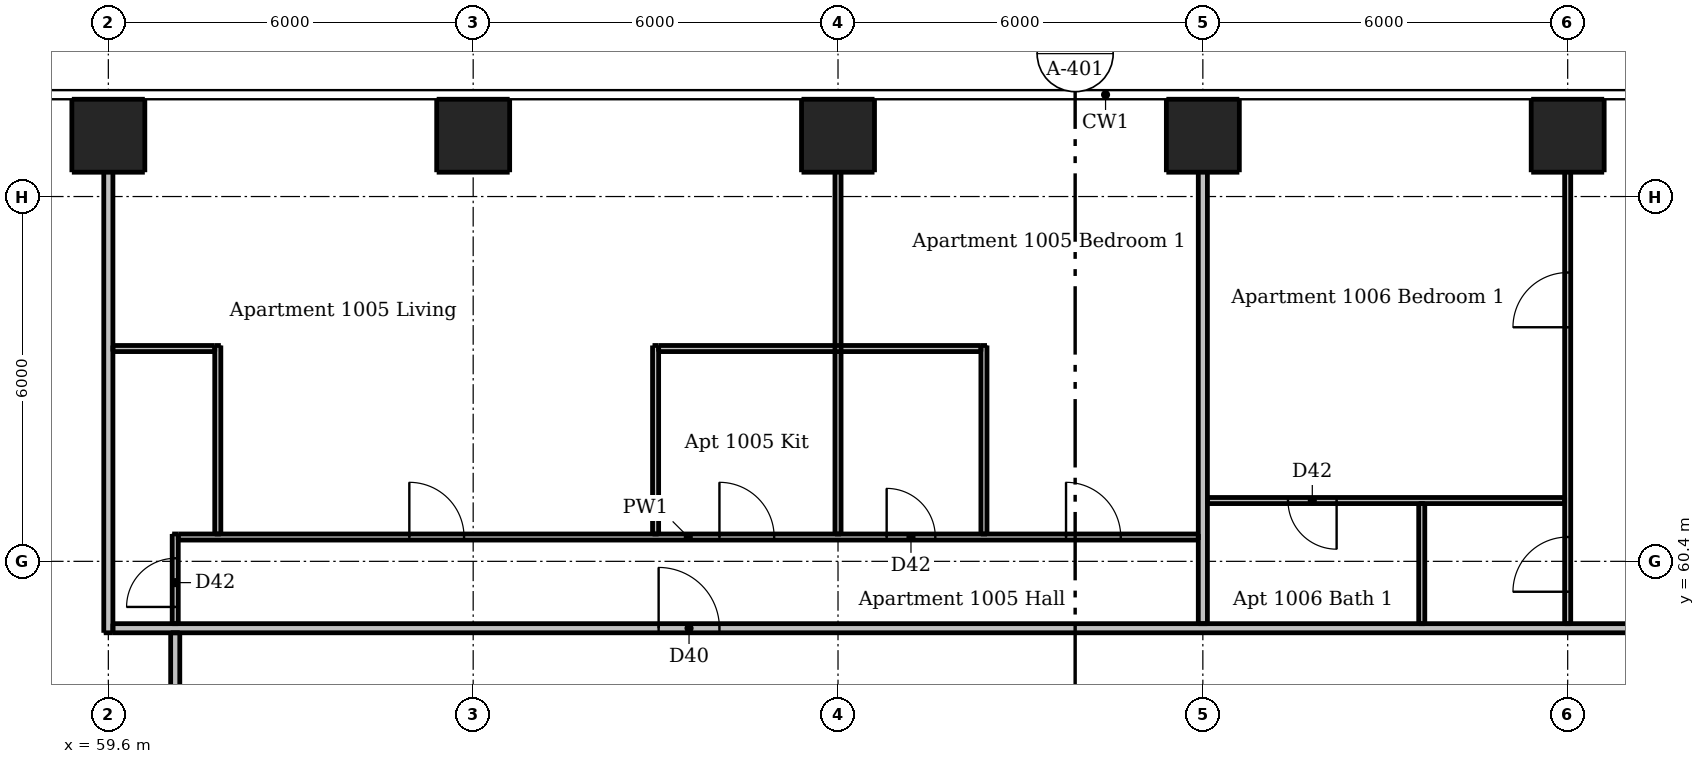
"""IFC4 building model, lengths in metres.
Left out: names, types, materials, properties, quantities, classifications, styles, units other than length and angle.
Written with IfcOpenShell. Run it as: python <this file> out.ifc"""

import sys

from ifc_helpers import new_model, si_unit, direction, frame, frame_2d, origin, origin_2d, place, context, subcontext, project, spatial, rectangle, extrude, element, fill, save


model = new_model("IFC4")
c1 = context("Model", 3, precision=1e-05, world=origin(), true_north=direction((0.0, 1.0)))
c2 = subcontext(c1, "Body", "Model", "MODEL_VIEW")
j1 = project(units=[si_unit("LENGTHUNIT", "METRE"), si_unit("PLANEANGLEUNIT", "RADIAN")], contexts=[c1])
p1 = place(None, origin())
s1 = spatial("IfcSite", under=j1, at=p1, CompositionType="ELEMENT")
p2 = place(p1, origin())
s2 = spatial("IfcBuilding", under=s1, at=p2, CompositionType="ELEMENT")
p3 = place(p2, frame((0.0, 0.0, 40.0)))
s3 = spatial("IfcBuildingStorey", under=s2, at=p3, CompositionType="ELEMENT", Elevation=40.0)
for number, where, z_axis, x_axis in (
    (1, (59.6, 67.4, 0.0), (0.0, 0.0, 1.0), (1.0, 0.0, 0.0)),
    (2, (65.6, 67.4, 0.0), (0.0, 0.0, 1.0), (1.0, 0.0, 0.0)),
    (3, (71.6, 67.4, 0.0), (0.0, 0.0, 1.0), (1.0, 0.0, 0.0)),
    (4, (77.6, 67.4, 0.0), (0.0, 0.0, 1.0), (1.0, 0.0, 0.0)),
    (5, (83.6, 67.4, 0.0), (0.0, 0.0, 1.0), (1.0, 0.0, 0.0)),
):
    element("IfcColumn", number, at=place(p3, frame(where, z_axis=z_axis, x_axis=x_axis)), inside=s3, PredefinedType="COLUMN", context=c2, shape_type="SweptSolid", body=[
        extrude(rectangle(XDim=1.2, YDim=1.2, at=origin_2d()), origin(), (0.0, 0.0, 1.0), 3.05),
    ])
p4 = place(p3, frame((60.7, 59.375, 0.0), z_axis=(0.0, 0.0, 1.0), x_axis=(0.0, 1.0, 0.0)))
e6 = element("IfcWall", 6, at=p4, inside=s3, PredefinedType="PARTITIONING", context=c2, shape_type="SweptSolid", body=[
    extrude(rectangle(XDim=1.475, YDim=0.1, at=frame_2d((0.738, 0.0))), origin(), (0.0, 0.0, 1.0), 3.05),
])
p5 = place(p4, frame((0.275, 0.0, 0.0)))
e7 = element("IfcOpeningElement", 7, at=p5, cuts=e6, PredefinedType="OPENING", context=c2, shape_type="SweptSolid", body=[
    extrude(rectangle(XDim=0.8, YDim=2.1, at=frame_2d((0.4, 1.05))), frame((0.0, 0.06, 0.0), z_axis=(0.0, -1.0, 0.0), x_axis=(1.0, 0.0, 0.0)), (0.0, 0.0, 1.0), 0.12),
])
for number, where, z_axis, x_axis in (
    (8, (61.4, 60.85, 0.0), (0.0, 0.0, 1.0), (0.0, 1.0, 0.0)),
    (9, (68.6, 60.85, 0.0), (0.0, 0.0, 1.0), (0.0, 1.0, 0.0)),
):
    element("IfcWall", number, at=place(p3, frame(where, z_axis=z_axis, x_axis=x_axis)), inside=s3, PredefinedType="PARTITIONING", context=c2, shape_type="SweptSolid", body=[
        extrude(rectangle(XDim=3.1, YDim=0.1, at=frame_2d((1.55, 0.0))), origin(), (0.0, 0.0, 1.0), 3.05),
    ])
p6 = place(p3, frame((71.6, 60.85, 0.0), z_axis=(0.0, 0.0, 1.0), x_axis=(0.0, 1.0, 0.0)))
e10 = element("IfcWall", 10, at=p6, inside=s3, PredefinedType="PARTITIONING", context=c2, shape_type="SweptSolid", body=[
    extrude(rectangle(XDim=7.15, YDim=0.1, at=frame_2d((3.575, 0.0))), origin(), (0.0, 0.0, 1.0), 2.516),
])
p7 = place(p3, frame((74.0, 60.85, 0.0), z_axis=(0.0, 0.0, 1.0), x_axis=(0.0, 1.0, 0.0)))
e11 = element("IfcWall", 11, at=p7, inside=s3, PredefinedType="PARTITIONING", context=c2, shape_type="SweptSolid", body=[
    extrude(rectangle(XDim=3.1, YDim=0.1, at=frame_2d((1.55, 0.0))), origin(), (0.0, 0.0, 1.0), 3.05),
])
p8 = place(p3, frame((81.2, 59.375, 0.0), z_axis=(0.0, 0.0, 1.0), x_axis=(0.0, 1.0, 0.0)))
e12 = element("IfcWall", 12, at=p8, inside=s3, PredefinedType="PARTITIONING", context=c2, shape_type="SweptSolid", body=[
    extrude(rectangle(XDim=1.975, YDim=0.1, at=frame_2d((0.988, 0.0))), origin(), (0.0, 0.0, 1.0), 3.05),
])
p9 = place(p3, frame((83.6, 59.375, 0.0), z_axis=(0.0, 0.0, 1.0), x_axis=(0.0, 1.0, 0.0)))
e13 = element("IfcWall", 13, at=p9, inside=s3, PredefinedType="PARTITIONING", context=c2, shape_type="SweptSolid", body=[
    extrude(rectangle(XDim=8.625, YDim=0.1, at=frame_2d((4.312, 0.0))), origin(), (0.0, 0.0, 1.0), 2.516),
])
p10 = place(p9, frame((0.525, 0.0, 0.0)))
e14 = element("IfcOpeningElement", 14, at=p10, cuts=e13, PredefinedType="OPENING", context=c2, shape_type="SweptSolid", body=[
    extrude(rectangle(XDim=0.9, YDim=2.1, at=frame_2d((0.45, 1.05))), frame((0.0, 0.06, 0.0), z_axis=(0.0, -1.0, 0.0), x_axis=(1.0, 0.0, 0.0)), (0.0, 0.0, 1.0), 0.12),
])
p11 = place(p9, frame((4.875, 0.0, 0.0)))
e15 = element("IfcOpeningElement", 15, at=p11, cuts=e13, PredefinedType="OPENING", context=c2, shape_type="SweptSolid", body=[
    extrude(rectangle(XDim=0.9, YDim=2.1, at=frame_2d((0.45, 1.05))), frame((0.0, 0.06, 0.0), z_axis=(0.0, -1.0, 0.0), x_axis=(1.0, 0.0, 0.0)), (0.0, 0.0, 1.0), 0.12),
])
p12 = place(p3, frame((59.675, 63.9, 0.0), z_axis=(0.0, 0.0, 1.0), x_axis=(1.0, 0.0, 0.0)))
e16 = element("IfcWall", 16, at=p12, inside=s3, PredefinedType="PARTITIONING", context=c2, shape_type="SweptSolid", body=[
    extrude(rectangle(XDim=1.675, YDim=0.1, at=frame_2d((0.837, 0.0))), origin(), (0.0, 0.0, 1.0), 3.05),
])
p13 = place(p3, frame((68.65, 63.9, 0.0), z_axis=(0.0, 0.0, 1.0), x_axis=(1.0, 0.0, 0.0)))
e17 = element("IfcWall", 17, at=p13, inside=s3, PredefinedType="PARTITIONING", context=c2, shape_type="SweptSolid", body=[
    extrude(rectangle(XDim=5.3, YDim=0.1, at=frame_2d((2.65, 0.0))), origin(), (0.0, 0.0, 1.0), 3.05),
])
p14 = place(p3, frame((83.55, 61.4, 0.0), z_axis=(0.0, 0.0, 1.0), x_axis=(-1.0, 0.0, 0.0)))
e18 = element("IfcWall", 18, at=p14, inside=s3, PredefinedType="PARTITIONING", context=c2, shape_type="SweptSolid", body=[
    extrude(rectangle(XDim=5.875, YDim=0.1, at=frame_2d((2.938, 0.0))), origin(), (0.0, 0.0, 1.0), 3.05),
])
p15 = place(p14, frame((3.75, 0.0, 0.0)))
e19 = element("IfcOpeningElement", 19, at=p15, cuts=e18, PredefinedType="OPENING", context=c2, shape_type="SweptSolid", body=[
    extrude(rectangle(XDim=0.8, YDim=2.1, at=frame_2d((0.4, 1.05))), frame((0.0, 0.06, 0.0), z_axis=(0.0, -1.0, 0.0), x_axis=(1.0, 0.0, 0.0)), (0.0, 0.0, 1.0), 0.12),
])
p16 = place(p3, frame((60.75, 60.8, 0.0), z_axis=(0.0, 0.0, 1.0), x_axis=(1.0, 0.0, 0.0)))
e20 = element("IfcWall", 20, at=p16, inside=s3, PredefinedType="PARTITIONING", context=c2, shape_type="SweptSolid", body=[
    extrude(rectangle(XDim=16.775, YDim=0.1, at=frame_2d((8.387, 0.0))), origin(), (0.0, 0.0, 1.0), 3.05),
])
p17 = place(p16, frame((3.8, 0.0, 0.0)))
e21 = element("IfcOpeningElement", 21, at=p17, cuts=e20, PredefinedType="OPENING", context=c2, shape_type="SweptSolid", body=[
    extrude(rectangle(XDim=0.9, YDim=2.1, at=frame_2d((0.45, 1.05))), frame((0.0, 0.06, 0.0), z_axis=(0.0, -1.0, 0.0), x_axis=(1.0, 0.0, 0.0)), (0.0, 0.0, 1.0), 0.12),
])
p18 = place(p16, frame((8.9, 0.0, 0.0)))
e22 = element("IfcOpeningElement", 22, at=p18, cuts=e20, PredefinedType="OPENING", context=c2, shape_type="SweptSolid", body=[
    extrude(rectangle(XDim=0.9, YDim=2.1, at=frame_2d((0.45, 1.05))), frame((0.0, 0.06, 0.0), z_axis=(0.0, -1.0, 0.0), x_axis=(1.0, 0.0, 0.0)), (0.0, 0.0, 1.0), 0.12),
])
p19 = place(p16, frame((14.6, 0.0, 0.0)))
e23 = element("IfcOpeningElement", 23, at=p19, cuts=e20, PredefinedType="OPENING", context=c2, shape_type="SweptSolid", body=[
    extrude(rectangle(XDim=0.9, YDim=2.1, at=frame_2d((0.45, 1.05))), frame((0.0, 0.06, 0.0), z_axis=(0.0, -1.0, 0.0), x_axis=(1.0, 0.0, 0.0)), (0.0, 0.0, 1.0), 0.12),
])
p20 = place(p16, frame((11.65, 0.0, 0.0)))
e24 = element("IfcOpeningElement", 24, at=p20, cuts=e20, PredefinedType="OPENING", context=c2, shape_type="SweptSolid", body=[
    extrude(rectangle(XDim=0.8, YDim=2.1, at=frame_2d((0.4, 1.05))), frame((0.0, 0.06, 0.0), z_axis=(0.0, -1.0, 0.0), x_axis=(1.0, 0.0, 0.0)), (0.0, 0.0, 1.0), 0.12),
])
p21 = place(p3, frame((59.6, 59.225, 0.0), z_axis=(0.0, 0.0, 1.0), x_axis=(0.0, 1.0, 0.0)))
e25 = element("IfcWall", 25, at=p21, inside=s3, PredefinedType="PARTITIONING", context=c2, shape_type="SweptSolid", body=[
    extrude(rectangle(XDim=8.775, YDim=0.15, at=frame_2d((4.387, 0.0))), origin(), (0.0, 0.0, 1.0), 2.51),
])
p22 = place(p3, frame((60.7, 30.325, 0.0), z_axis=(0.0, 0.0, 1.0), x_axis=(0.0, 1.0, 0.0)))
e26 = element("IfcWall", 26, at=p22, inside=s3, PredefinedType="PARTITIONING", context=c2, shape_type="SweptSolid", body=[
    extrude(rectangle(XDim=28.9, YDim=0.15, at=frame_2d((14.45, 0.0))), origin(), (0.0, 0.0, 1.0), 3.05),
])
p23 = place(p22, frame((9.225, 0.0, 0.0)))
e27 = element("IfcOpeningElement", 27, at=p23, cuts=e26, PredefinedType="OPENING", context=c2, shape_type="SweptSolid", body=[
    extrude(rectangle(XDim=1.0, YDim=2.1, at=frame_2d((0.5, 1.05))), frame((0.0, 0.085, 0.0), z_axis=(0.0, -1.0, 0.0), x_axis=(1.0, 0.0, 0.0)), (0.0, 0.0, 1.0), 0.17),
])
p24 = place(p22, frame((26.025, 0.0, 0.0)))
e28 = element("IfcOpeningElement", 28, at=p24, cuts=e26, PredefinedType="OPENING", context=c2, shape_type="SweptSolid", body=[
    extrude(rectangle(XDim=1.0, YDim=2.1, at=frame_2d((0.5, 1.05))), frame((0.0, 0.085, 0.0), z_axis=(0.0, -1.0, 0.0), x_axis=(1.0, 0.0, 0.0)), (0.0, 0.0, 1.0), 0.17),
])
p25 = place(p3, frame((77.6, 59.375, 0.0), z_axis=(0.0, 0.0, 1.0), x_axis=(0.0, 1.0, 0.0)))
e29 = element("IfcWall", 29, at=p25, inside=s3, PredefinedType="PARTITIONING", context=c2, shape_type="SweptSolid", body=[
    extrude(rectangle(XDim=8.625, YDim=0.15, at=frame_2d((4.312, 0.0))), origin(), (0.0, 0.0, 1.0), 2.516),
])
p26 = place(p3, frame((59.675, 59.3, 0.0), z_axis=(0.0, 0.0, 1.0), x_axis=(1.0, 0.0, 0.0)))
e30 = element("IfcWall", 30, at=p26, inside=s3, PredefinedType="PARTITIONING", context=c2, shape_type="SweptSolid", body=[
    extrude(rectangle(XDim=28.55, YDim=0.15, at=frame_2d((14.275, 0.0))), origin(), (0.0, 0.0, 1.0), 3.05),
])
p27 = place(p26, frame((8.975, 0.0, 0.0)))
e31 = element("IfcOpeningElement", 31, at=p27, cuts=e30, PredefinedType="OPENING", context=c2, shape_type="SweptSolid", body=[
    extrude(rectangle(XDim=1.0, YDim=2.1, at=frame_2d((0.5, 1.05))), frame((0.0, 0.085, 0.0), z_axis=(0.0, -1.0, 0.0), x_axis=(1.0, 0.0, 0.0)), (0.0, 0.0, 1.0), 0.17),
])
p28 = place(p26, frame((25.775, 0.0, 0.0)))
e32 = element("IfcOpeningElement", 32, at=p28, cuts=e30, PredefinedType="OPENING", context=c2, shape_type="SweptSolid", body=[
    extrude(rectangle(XDim=1.0, YDim=2.1, at=frame_2d((0.5, 1.05))), frame((0.0, 0.085, 0.0), z_axis=(0.0, -1.0, 0.0), x_axis=(1.0, 0.0, 0.0)), (0.0, 0.0, 1.0), 0.17),
])
p29 = place(p27, origin())
e33 = element("IfcDoor", 33, at=p29, inside=s3, OperationType="SINGLE_SWING_LEFT", PredefinedType="DOOR", context=c2, shape_type="SweptSolid", body=[
    extrude(rectangle(XDim=1.0, YDim=2.1, at=frame_2d((0.5, 1.05))), frame((0.0, 0.025, 0.0), z_axis=(0.0, -1.0, 0.0), x_axis=(1.0, 0.0, 0.0)), (0.0, 0.0, 1.0), 0.05),
])
fill(e31, e33)
p30 = place(p17, origin())
e34 = element("IfcDoor", 34, at=p30, inside=s3, OperationType="SINGLE_SWING_LEFT", PredefinedType="DOOR", context=c2, shape_type="SweptSolid", body=[
    extrude(rectangle(XDim=0.9, YDim=2.1, at=frame_2d((0.45, 1.05))), frame((0.0, 0.025, 0.0), z_axis=(0.0, -1.0, 0.0), x_axis=(1.0, 0.0, 0.0)), (0.0, 0.0, 1.0), 0.05),
])
fill(e21, e34)
p31 = place(p18, origin())
e35 = element("IfcDoor", 35, at=p31, inside=s3, OperationType="SINGLE_SWING_LEFT", PredefinedType="DOOR", context=c2, shape_type="SweptSolid", body=[
    extrude(rectangle(XDim=0.9, YDim=2.1, at=frame_2d((0.45, 1.05))), frame((0.0, 0.025, 0.0), z_axis=(0.0, -1.0, 0.0), x_axis=(1.0, 0.0, 0.0)), (0.0, 0.0, 1.0), 0.05),
])
fill(e22, e35)
p32 = place(p5, origin())
e36 = element("IfcDoor", 36, at=p32, inside=s3, OperationType="SINGLE_SWING_LEFT", PredefinedType="DOOR", context=c2, shape_type="SweptSolid", body=[
    extrude(rectangle(XDim=0.8, YDim=2.1, at=frame_2d((0.4, 1.05))), frame((0.0, 0.025, 0.0), z_axis=(0.0, -1.0, 0.0), x_axis=(1.0, 0.0, 0.0)), (0.0, 0.0, 1.0), 0.05),
])
fill(e7, e36)
p33 = place(p19, origin())
e37 = element("IfcDoor", 37, at=p33, inside=s3, OperationType="SINGLE_SWING_LEFT", PredefinedType="DOOR", context=c2, shape_type="SweptSolid", body=[
    extrude(rectangle(XDim=0.9, YDim=2.1, at=frame_2d((0.45, 1.05))), frame((0.0, 0.025, 0.0), z_axis=(0.0, -1.0, 0.0), x_axis=(1.0, 0.0, 0.0)), (0.0, 0.0, 1.0), 0.05),
])
fill(e23, e37)
p34 = place(p20, origin())
e38 = element("IfcDoor", 38, at=p34, inside=s3, OperationType="SINGLE_SWING_LEFT", PredefinedType="DOOR", context=c2, shape_type="SweptSolid", body=[
    extrude(rectangle(XDim=0.8, YDim=2.1, at=frame_2d((0.4, 1.05))), frame((0.0, 0.025, 0.0), z_axis=(0.0, -1.0, 0.0), x_axis=(1.0, 0.0, 0.0)), (0.0, 0.0, 1.0), 0.05),
])
fill(e24, e38)
p35 = place(p10, origin())
e39 = element("IfcDoor", 39, at=p35, inside=s3, OperationType="SINGLE_SWING_LEFT", PredefinedType="DOOR", context=c2, shape_type="SweptSolid", body=[
    extrude(rectangle(XDim=0.9, YDim=2.1, at=frame_2d((0.45, 1.05))), frame((0.0, 0.025, 0.0), z_axis=(0.0, -1.0, 0.0), x_axis=(1.0, 0.0, 0.0)), (0.0, 0.0, 1.0), 0.05),
])
fill(e14, e39)
p36 = place(p11, origin())
e40 = element("IfcDoor", 40, at=p36, inside=s3, OperationType="SINGLE_SWING_LEFT", PredefinedType="DOOR", context=c2, shape_type="SweptSolid", body=[
    extrude(rectangle(XDim=0.9, YDim=2.1, at=frame_2d((0.45, 1.05))), frame((0.0, 0.025, 0.0), z_axis=(0.0, -1.0, 0.0), x_axis=(1.0, 0.0, 0.0)), (0.0, 0.0, 1.0), 0.05),
])
fill(e15, e40)
p37 = place(p15, origin())
e41 = element("IfcDoor", 41, at=p37, inside=s3, OperationType="SINGLE_SWING_LEFT", PredefinedType="DOOR", context=c2, shape_type="SweptSolid", body=[
    extrude(rectangle(XDim=0.8, YDim=2.1, at=frame_2d((0.4, 1.05))), frame((0.0, 0.025, 0.0), z_axis=(0.0, -1.0, 0.0), x_axis=(1.0, 0.0, 0.0)), (0.0, 0.0, 1.0), 0.05),
])
fill(e19, e41)
save(model, sys.argv[1])
